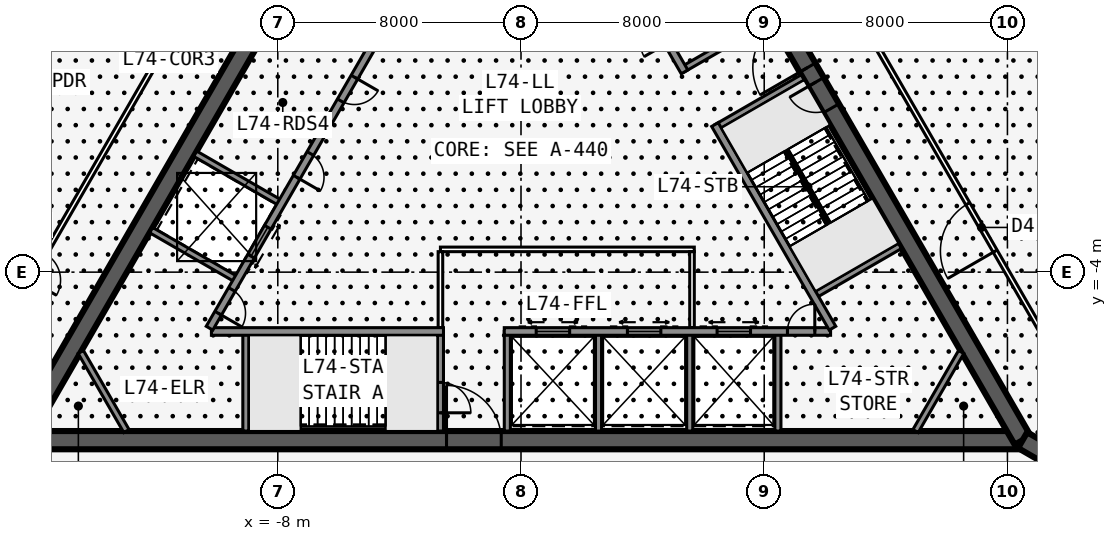
"""IFC4 building model, lengths in metres.
Left out: names, types, materials, properties, quantities, classifications, styles, units other than length and angle.
Written with IfcOpenShell. Run it as: python <this file> out.ifc"""

import sys

from ifc_helpers import new_model, si_unit, direction, frame, frame_2d, origin, place, context, subcontext, project, spatial, rectangle, extrude, element, fill, save


model = new_model("IFC4")
c1 = context("Model", 3, precision=1e-05, world=origin(), true_north=direction((0.0, 1.0)))
c2 = subcontext(c1, "Body", "Model", "MODEL_VIEW")
j1 = project(units=[si_unit("LENGTHUNIT", "METRE"), si_unit("PLANEANGLEUNIT", "RADIAN")], contexts=[c1])
p1 = place(None, origin())
s1 = spatial("IfcSite", under=j1, at=p1, CompositionType="ELEMENT")
p2 = place(p1, origin())
s2 = spatial("IfcBuilding", under=s1, at=p2, CompositionType="ELEMENT")
p3 = place(p2, frame((0.0, 0.0, 281.3)))
s3 = spatial("IfcBuildingStorey", under=s2, at=p3, CompositionType="ELEMENT", Elevation=281.3)
p4 = place(p3, frame((-16.5, -9.526, 0.0), z_axis=(0.0, 0.0, 1.0), x_axis=(1.0, 0.0, 0.0)))
e1 = element("IfcWall", 1, at=p4, inside=s3, PredefinedType="SHEAR", context=c2, shape_type="SweptSolid", body=[
    extrude(rectangle(XDim=33.0, YDim=0.6, at=frame_2d((16.5, 0.0))), origin(), (0.0, 0.0, 1.0), 5.5),
])
p5 = place(p4, frame((14.05, 0.0, 0.0)))
e2 = element("IfcOpeningElement", 2, at=p5, cuts=e1, PredefinedType="OPENING", context=c2, shape_type="SweptSolid", body=[
    extrude(rectangle(XDim=1.8, YDim=2.13, at=frame_2d((0.9, 1.065))), frame((0.0, 0.31, 0.0), z_axis=(0.0, -1.0, 0.0), x_axis=(1.0, 0.0, 0.0)), (0.0, 0.0, 1.0), 0.62),
])
p6 = place(p3, frame((-10.183, -5.951, 0.0), z_axis=(0.0, 0.0, 1.0), x_axis=(1.0, 0.0, 0.0)))
e3 = element("IfcWall", 3, at=p6, inside=s3, PredefinedType="SOLIDWALL", context=c2, shape_type="SweptSolid", body=[
    extrude(rectangle(XDim=7.633, YDim=0.25, at=frame_2d((3.816, 0.0))), origin(), (0.0, 0.0, 1.0), 5.25),
])
p7 = place(p3, frame((-0.55, -5.951, 0.0), z_axis=(0.0, 0.0, 1.0), x_axis=(1.0, 0.0, 0.0)))
e4 = element("IfcWall", 4, at=p7, inside=s3, PredefinedType="SOLIDWALL", context=c2, shape_type="SweptSolid", body=[
    extrude(rectangle(XDim=10.733, YDim=0.25, at=frame_2d((5.366, 0.0))), origin(), (0.0, 0.0, 1.0), 5.25),
])
p8 = place(p7, frame((9.314, 0.0, 0.0)))
e5 = element("IfcOpeningElement", 5, at=p8, cuts=e4, PredefinedType="OPENING", context=c2, shape_type="SweptSolid", body=[
    extrude(rectangle(XDim=0.9, YDim=2.13, at=frame_2d((0.45, 1.065))), frame((0.0, 0.135, 0.0), z_axis=(0.0, -1.0, 0.0), x_axis=(1.0, 0.0, 0.0)), (0.0, 0.0, 1.0), 0.27),
])
p9 = place(p7, frame((1.05, 0.0, 0.0)))
e6 = element("IfcOpeningElement", 6, at=p9, cuts=e4, PredefinedType="OPENING", context=c2, shape_type="SweptSolid", body=[
    extrude(rectangle(XDim=1.1, YDim=2.13, at=frame_2d((0.55, 1.065))), frame((0.0, 0.135, 0.0), z_axis=(0.0, -1.0, 0.0), x_axis=(1.0, 0.0, 0.0)), (0.0, 0.0, 1.0), 0.27),
])
p10 = place(p7, frame((4.05, 0.0, 0.0)))
e7 = element("IfcOpeningElement", 7, at=p10, cuts=e4, PredefinedType="OPENING", context=c2, shape_type="SweptSolid", body=[
    extrude(rectangle(XDim=1.1, YDim=2.13, at=frame_2d((0.55, 1.065))), frame((0.0, 0.135, 0.0), z_axis=(0.0, -1.0, 0.0), x_axis=(1.0, 0.0, 0.0)), (0.0, 0.0, 1.0), 0.27),
])
p11 = place(p7, frame((7.0, 0.0, 0.0)))
e8 = element("IfcOpeningElement", 8, at=p11, cuts=e4, PredefinedType="OPENING", context=c2, shape_type="SweptSolid", body=[
    extrude(rectangle(XDim=1.1, YDim=2.13, at=frame_2d((0.55, 1.065))), frame((0.0, 0.135, 0.0), z_axis=(0.0, -1.0, 0.0), x_axis=(1.0, 0.0, 0.0)), (0.0, 0.0, 1.0), 0.27),
])
p12 = place(p3, frame((-9.05, -5.951, 0.0), z_axis=(0.0, 0.0, 1.0), x_axis=(0.0, -1.0, 0.0)))
e9 = element("IfcWall", 9, at=p12, inside=s3, PredefinedType="SOLIDWALL", context=c2, shape_type="SweptSolid", body=[
    extrude(rectangle(XDim=3.275, YDim=0.2, at=frame_2d((1.637, 0.0))), origin(), (0.0, 0.0, 1.0), 5.25),
])
p13 = place(p3, frame((-2.65, -5.951, 0.0), z_axis=(0.0, 0.0, 1.0), x_axis=(0.0, -1.0, 0.0)))
e10 = element("IfcWall", 10, at=p13, inside=s3, PredefinedType="SOLIDWALL", context=c2, shape_type="SweptSolid", body=[
    extrude(rectangle(XDim=3.275, YDim=0.2, at=frame_2d((1.637, 0.0))), origin(), (0.0, 0.0, 1.0), 5.25),
])
p14 = place(p13, frame((1.675, 0.0, 0.0)))
e11 = element("IfcOpeningElement", 11, at=p14, cuts=e10, PredefinedType="OPENING", context=c2, shape_type="SweptSolid", body=[
    extrude(rectangle(XDim=1.0, YDim=2.13, at=frame_2d((0.5, 1.065))), frame((0.0, 0.11, 0.0), z_axis=(0.0, -1.0, 0.0), x_axis=(1.0, 0.0, 0.0)), (0.0, 0.0, 1.0), 0.22),
])
for number, where, z_axis, x_axis in (
    (12, (-0.45, -5.951, 0.0), (0.0, 0.0, 1.0), (0.0, -1.0, 0.0)),
    (13, (2.55, -5.951, 0.0), (0.0, 0.0, 1.0), (0.0, -1.0, 0.0)),
    (14, (5.55, -5.951, 0.0), (0.0, 0.0, 1.0), (0.0, -1.0, 0.0)),
    (15, (8.45, -5.951, 0.0), (0.0, 0.0, 1.0), (0.0, -1.0, 0.0)),
):
    element("IfcWall", number, at=place(p3, frame(where, z_axis=z_axis, x_axis=x_axis)), inside=s3, PredefinedType="SOLIDWALL", context=c2, shape_type="SweptSolid", body=[
        extrude(rectangle(XDim=3.275, YDim=0.2, at=frame_2d((1.637, 0.0))), origin(), (0.0, 0.0, 1.0), 5.25),
    ])
p15 = place(p3, frame((16.5, -9.526, 0.0), z_axis=(0.0, 0.0, 1.0), x_axis=(-0.499999749417, 0.866025548458, 0.0)))
e16 = element("IfcWall", 16, at=p15, inside=s3, PredefinedType="SHEAR", context=c2, shape_type="SweptSolid", body=[
    extrude(rectangle(XDim=33.0, YDim=0.6, at=frame_2d((16.5, 0.0))), origin(), (0.0, 0.0, 1.0), 5.5),
])
p16 = place(p15, frame((14.15, 0.0, 0.0)))
e17 = element("IfcOpeningElement", 17, at=p16, cuts=e16, PredefinedType="OPENING", context=c2, shape_type="SweptSolid", body=[
    extrude(rectangle(XDim=1.8, YDim=2.13, at=frame_2d((0.9, 1.065))), frame((0.0, 0.31, 0.0), z_axis=(0.0, -1.0, 0.0), x_axis=(1.0, 0.0, 0.0)), (0.0, 0.0, 1.0), 0.62),
])
p17 = place(p15, frame((12.6, 0.0, 0.0)))
e18 = element("IfcOpeningElement", 18, at=p17, cuts=e16, PredefinedType="OPENING", context=c2, shape_type="SweptSolid", body=[
    extrude(rectangle(XDim=1.0, YDim=2.13, at=frame_2d((0.5, 1.065))), frame((0.0, 0.31, 0.0), z_axis=(0.0, -1.0, 0.0), x_axis=(1.0, 0.0, 0.0)), (0.0, 0.0, 1.0), 0.62),
])
p18 = place(p3, frame((10.245, -5.843, 0.0), z_axis=(0.0, 0.0, 1.0), x_axis=(-0.499993009313, 0.866029439822, 0.0)))
e19 = element("IfcWall", 19, at=p18, inside=s3, PredefinedType="SOLIDWALL", context=c2, shape_type="SweptSolid", body=[
    extrude(rectangle(XDim=7.733, YDim=0.25, at=frame_2d((3.866, 0.0))), origin(), (0.0, 0.0, 1.0), 5.25),
])
p19 = place(p3, frame((5.379, 2.586, 0.0), z_axis=(0.0, 0.0, 1.0), x_axis=(-0.500001375892, 0.866024609411, 0.0)))
e20 = element("IfcWall", 20, at=p19, inside=s3, PredefinedType="SOLIDWALL", context=c2, shape_type="SweptSolid", body=[
    extrude(rectangle(XDim=10.633, YDim=0.25, at=frame_2d((5.316, 0.0))), origin(), (0.0, 0.0, 1.0), 5.25),
])
p20 = place(p19, frame((9.164, 0.0, 0.0)))
e21 = element("IfcOpeningElement", 21, at=p20, cuts=e20, PredefinedType="OPENING", context=c2, shape_type="SweptSolid", body=[
    extrude(rectangle(XDim=0.9, YDim=2.13, at=frame_2d((0.45, 1.065))), frame((0.0, 0.135, 0.0), z_axis=(0.0, -1.0, 0.0), x_axis=(1.0, 0.0, 0.0)), (0.0, 0.0, 1.0), 0.27),
])
p21 = place(p19, frame((1.1, 0.0, 0.0)))
e22 = element("IfcOpeningElement", 22, at=p21, cuts=e20, PredefinedType="OPENING", context=c2, shape_type="SweptSolid", body=[
    extrude(rectangle(XDim=0.9, YDim=2.13, at=frame_2d((0.45, 1.065))), frame((0.0, 0.135, 0.0), z_axis=(0.0, -1.0, 0.0), x_axis=(1.0, 0.0, 0.0)), (0.0, 0.0, 1.0), 0.27),
])
p22 = place(p19, frame((4.0, 0.0, 0.0)))
e23 = element("IfcOpeningElement", 23, at=p22, cuts=e20, PredefinedType="OPENING", context=c2, shape_type="SweptSolid", body=[
    extrude(rectangle(XDim=0.9, YDim=2.13, at=frame_2d((0.45, 1.065))), frame((0.0, 0.135, 0.0), z_axis=(0.0, -1.0, 0.0), x_axis=(1.0, 0.0, 0.0)), (0.0, 0.0, 1.0), 0.27),
])
p23 = place(p19, frame((6.9, 0.0, 0.0)))
e24 = element("IfcOpeningElement", 24, at=p23, cuts=e20, PredefinedType="OPENING", context=c2, shape_type="SweptSolid", body=[
    extrude(rectangle(XDim=0.9, YDim=2.13, at=frame_2d((0.45, 1.065))), frame((0.0, 0.135, 0.0), z_axis=(0.0, -1.0, 0.0), x_axis=(1.0, 0.0, 0.0)), (0.0, 0.0, 1.0), 0.27),
])
p24 = place(p3, frame((9.629, -4.775, 0.0), z_axis=(0.0, 0.0, 1.0), x_axis=(0.865995643347, 0.500051543047, 0.0)))
e25 = element("IfcWall", 25, at=p24, inside=s3, PredefinedType="SOLIDWALL", context=c2, shape_type="SweptSolid", body=[
    extrude(rectangle(XDim=3.275, YDim=0.2, at=frame_2d((1.638, 0.0))), origin(), (0.0, 0.0, 1.0), 5.25),
])
for number, where, z_axis, x_axis in (
    (26, (6.429, 0.767, 0.0), (0.0, 0.0, 1.0), (0.866, 0.5, 0.0)),
    (27, (5.329, 2.673, 0.0), (0.0, 0.0, 1.0), (0.866, 0.5, 0.0)),
):
    element("IfcWall", number, at=place(p3, frame(where, z_axis=z_axis, x_axis=x_axis)), inside=s3, PredefinedType="SOLIDWALL", context=c2, shape_type="SweptSolid", body=[
        extrude(rectangle(XDim=3.275, YDim=0.2, at=frame_2d((1.637, 0.0))), origin(), (0.0, 0.0, 1.0), 5.25),
    ])
p25 = place(p3, frame((0.0, 19.052, 0.0), z_axis=(0.0, 0.0, 1.0), x_axis=(-0.499999749417, -0.866025548458, 0.0)))
e28 = element("IfcWall", 28, at=p25, inside=s3, PredefinedType="SHEAR", context=c2, shape_type="SweptSolid", body=[
    extrude(rectangle(XDim=33.0, YDim=0.6, at=frame_2d((16.5, 0.0))), origin(), (0.0, 0.0, 1.0), 5.5),
])
p26 = place(p25, frame((14.15, 0.0, 0.0)))
e29 = element("IfcOpeningElement", 29, at=p26, cuts=e28, PredefinedType="OPENING", context=c2, shape_type="SweptSolid", body=[
    extrude(rectangle(XDim=1.8, YDim=2.13, at=frame_2d((0.9, 1.065))), frame((0.0, 0.31, 0.0), z_axis=(0.0, -1.0, 0.0), x_axis=(1.0, 0.0, 0.0)), (0.0, 0.0, 1.0), 0.62),
])
p27 = place(p25, frame((12.6, 0.0, 0.0)))
e30 = element("IfcOpeningElement", 30, at=p27, cuts=e28, PredefinedType="OPENING", context=c2, shape_type="SweptSolid", body=[
    extrude(rectangle(XDim=1.0, YDim=2.13, at=frame_2d((0.5, 1.065))), frame((0.0, 0.31, 0.0), z_axis=(0.0, -1.0, 0.0), x_axis=(1.0, 0.0, 0.0)), (0.0, 0.0, 1.0), 0.62),
])
p28 = place(p3, frame((-4.929, 3.365, 0.0), z_axis=(0.0, 0.0, 1.0), x_axis=(-0.499991433582, -0.866030349552, 0.0)))
e31 = element("IfcWall", 31, at=p28, inside=s3, PredefinedType="SOLIDWALL", context=c2, shape_type="SweptSolid", body=[
    extrude(rectangle(XDim=10.633, YDim=0.25, at=frame_2d((5.316, 0.0))), origin(), (0.0, 0.0, 1.0), 5.25),
])
p29 = place(p28, frame((9.164, 0.0, 0.0)))
e32 = element("IfcOpeningElement", 32, at=p29, cuts=e31, PredefinedType="OPENING", context=c2, shape_type="SweptSolid", body=[
    extrude(rectangle(XDim=0.9, YDim=2.13, at=frame_2d((0.45, 1.065))), frame((0.0, 0.135, 0.0), z_axis=(0.0, -1.0, 0.0), x_axis=(1.0, 0.0, 0.0)), (0.0, 0.0, 1.0), 0.27),
])
p30 = place(p28, frame((1.1, 0.0, 0.0)))
e33 = element("IfcOpeningElement", 33, at=p30, cuts=e31, PredefinedType="OPENING", context=c2, shape_type="SweptSolid", body=[
    extrude(rectangle(XDim=0.9, YDim=2.13, at=frame_2d((0.45, 1.065))), frame((0.0, 0.135, 0.0), z_axis=(0.0, -1.0, 0.0), x_axis=(1.0, 0.0, 0.0)), (0.0, 0.0, 1.0), 0.27),
])
p31 = place(p28, frame((4.0, 0.0, 0.0)))
e34 = element("IfcOpeningElement", 34, at=p31, cuts=e31, PredefinedType="OPENING", context=c2, shape_type="SweptSolid", body=[
    extrude(rectangle(XDim=0.9, YDim=2.13, at=frame_2d((0.45, 1.065))), frame((0.0, 0.135, 0.0), z_axis=(0.0, -1.0, 0.0), x_axis=(1.0, 0.0, 0.0)), (0.0, 0.0, 1.0), 0.27),
])
p32 = place(p28, frame((6.8, 0.0, 0.0)))
e35 = element("IfcOpeningElement", 35, at=p32, cuts=e31, PredefinedType="OPENING", context=c2, shape_type="SweptSolid", body=[
    extrude(rectangle(XDim=1.1, YDim=2.13, at=frame_2d((0.55, 1.065))), frame((0.0, 0.135, 0.0), z_axis=(0.0, -1.0, 0.0), x_axis=(1.0, 0.0, 0.0)), (0.0, 0.0, 1.0), 0.27),
])
for number, where, z_axis, x_axis in (
    (36, (-4.979, 3.279, 0.0), (0.0, 0.0, 1.0), (-0.866, 0.5, 0.0)),
    (37, (-7.879, -1.744, 0.0), (0.0, 0.0, 1.0), (-0.866, 0.5, 0.0)),
    (38, (-9.329, -4.256, 0.0), (0.0, 0.0, 1.0), (-0.866, 0.5, 0.0)),
):
    element("IfcWall", number, at=place(p3, frame(where, z_axis=z_axis, x_axis=x_axis)), inside=s3, PredefinedType="SOLIDWALL", context=c2, shape_type="SweptSolid", body=[
        extrude(rectangle(XDim=3.275, YDim=0.2, at=frame_2d((1.637, 0.0))), origin(), (0.0, 0.0, 1.0), 5.25),
    ])
p33 = place(p3, frame((16.5, -9.526, 0.0), z_axis=(0.0, 0.0, 1.0), x_axis=(0.866031398331, -0.499989616998, 0.0)))
e39 = element("IfcWall", 39, at=p33, inside=s3, PredefinedType="SHEAR", context=c2, shape_type="SweptSolid", body=[
    extrude(rectangle(XDim=4.746, YDim=0.6, at=frame_2d((2.373, 0.0))), origin(), (0.0, 0.0, 1.0), 5.5),
])
p34 = place(p33, frame((1.65, 0.0, 0.0)))
e40 = element("IfcOpeningElement", 40, at=p34, cuts=e39, PredefinedType="OPENING", context=c2, shape_type="SweptSolid", body=[
    extrude(rectangle(XDim=1.8, YDim=2.13, at=frame_2d((0.9, 1.065))), frame((0.0, 0.31, 0.0), z_axis=(0.0, -1.0, 0.0), x_axis=(1.0, 0.0, 0.0)), (0.0, 0.0, 1.0), 0.62),
])
p35 = place(p3, frame((20.177, -11.245, 0.0), z_axis=(0.0, 0.0, 1.0), x_axis=(-0.499998875317, 0.866026053119, 0.0)))
e41 = element("IfcWall", 41, at=p35, inside=s3, PredefinedType="PARTITIONING", context=c2, shape_type="SweptSolid", body=[
    extrude(rectangle(XDim=39.654, YDim=0.15, at=frame_2d((19.827, 0.0))), origin(), (0.0, 0.0, 1.0), 5.25),
])
p36 = place(p35, frame((9.164, 0.0, 0.0)))
e42 = element("IfcOpeningElement", 42, at=p36, cuts=e41, PredefinedType="OPENING", context=c2, shape_type="SweptSolid", body=[
    extrude(rectangle(XDim=1.8, YDim=2.13, at=frame_2d((0.9, 1.065))), frame((0.0, 0.085, 0.0), z_axis=(0.0, -1.0, 0.0), x_axis=(1.0, 0.0, 0.0)), (0.0, 0.0, 1.0), 0.17),
])
p37 = place(p35, frame((28.69, 0.0, 0.0)))
e43 = element("IfcOpeningElement", 43, at=p37, cuts=e41, PredefinedType="OPENING", context=c2, shape_type="SweptSolid", body=[
    extrude(rectangle(XDim=1.8, YDim=2.13, at=frame_2d((0.9, 1.065))), frame((0.0, 0.085, 0.0), z_axis=(0.0, -1.0, 0.0), x_axis=(1.0, 0.0, 0.0)), (0.0, 0.0, 1.0), 0.17),
])
p38 = place(p3, frame((-0.35, 23.096, 0.0), z_axis=(0.0, 0.0, 1.0), x_axis=(-0.499998875317, -0.866026053119, 0.0)))
e44 = element("IfcWall", 44, at=p38, inside=s3, PredefinedType="PARTITIONING", context=c2, shape_type="SweptSolid", body=[
    extrude(rectangle(XDim=39.654, YDim=0.15, at=frame_2d((19.827, 0.0))), origin(), (0.0, 0.0, 1.0), 5.25),
])
p39 = place(p38, frame((8.063, 0.0, 0.0)))
e45 = element("IfcOpeningElement", 45, at=p39, cuts=e44, PredefinedType="OPENING", context=c2, shape_type="SweptSolid", body=[
    extrude(rectangle(XDim=1.0, YDim=2.13, at=frame_2d((0.5, 1.065))), frame((0.0, 0.085, 0.0), z_axis=(0.0, -1.0, 0.0), x_axis=(1.0, 0.0, 0.0)), (0.0, 0.0, 1.0), 0.17),
])
p40 = place(p38, frame((17.827, 0.0, 0.0)))
e46 = element("IfcOpeningElement", 46, at=p40, cuts=e44, PredefinedType="OPENING", context=c2, shape_type="SweptSolid", body=[
    extrude(rectangle(XDim=1.0, YDim=2.13, at=frame_2d((0.5, 1.065))), frame((0.0, 0.085, 0.0), z_axis=(0.0, -1.0, 0.0), x_axis=(1.0, 0.0, 0.0)), (0.0, 0.0, 1.0), 0.17),
])
p41 = place(p38, frame((20.827, 0.0, 0.0)))
e47 = element("IfcOpeningElement", 47, at=p41, cuts=e44, PredefinedType="OPENING", context=c2, shape_type="SweptSolid", body=[
    extrude(rectangle(XDim=1.0, YDim=2.13, at=frame_2d((0.5, 1.065))), frame((0.0, 0.085, 0.0), z_axis=(0.0, -1.0, 0.0), x_axis=(1.0, 0.0, 0.0)), (0.0, 0.0, 1.0), 0.17),
])
p42 = place(p38, frame((30.591, 0.0, 0.0)))
e48 = element("IfcOpeningElement", 48, at=p42, cuts=e44, PredefinedType="OPENING", context=c2, shape_type="SweptSolid", body=[
    extrude(rectangle(XDim=1.0, YDim=2.13, at=frame_2d((0.5, 1.065))), frame((0.0, 0.085, 0.0), z_axis=(0.0, -1.0, 0.0), x_axis=(1.0, 0.0, 0.0)), (0.0, 0.0, 1.0), 0.17),
])
p43 = place(p3, frame((-2.65, -3.251, 0.0), z_axis=(0.0, 0.0, 1.0), x_axis=(1.0, 0.0, 0.0)))
e49 = element("IfcWall", 49, at=p43, inside=s3, PredefinedType="PARTITIONING", context=c2, shape_type="SweptSolid", body=[
    extrude(rectangle(XDim=8.35, YDim=0.15, at=frame_2d((4.175, 0.0))), origin(), (0.0, 0.0, 1.0), 5.25),
])
for number, where, z_axis, x_axis in (
    (50, (-2.65, -5.826, 0.0), (0.0, 0.0, 1.0), (0.0, 1.0, 0.0)),
    (51, (5.625, -5.826, 0.0), (0.0, 0.0, 1.0), (0.0, 1.0, 0.0)),
):
    element("IfcWall", number, at=place(p3, frame(where, z_axis=z_axis, x_axis=x_axis)), inside=s3, PredefinedType="PARTITIONING", context=c2, shape_type="SweptSolid", body=[
        extrude(rectangle(XDim=2.5, YDim=0.15, at=frame_2d((1.25, 0.0))), origin(), (0.0, 0.0, 1.0), 5.25),
    ])
for number, where, z_axis, x_axis in (
    (52, (14.479, -6.626, 0.0), (0.0, 0.0, 1.0), (-0.5, -0.866, 0.0)),
    (53, (-12.978, -9.226, 0.0), (0.0, 0.0, 1.0), (-0.5, 0.866, 0.0)),
):
    element("IfcWall", number, at=place(p3, frame(where, z_axis=z_axis, x_axis=x_axis)), inside=s3, PredefinedType="SOLIDWALL", context=c2, shape_type="SweptSolid", body=[
        extrude(rectangle(XDim=3.002, YDim=0.2, at=frame_2d((1.501, 0.0))), origin(), (0.0, 0.0, 1.0), 5.25),
    ])
p44 = place(p3, frame((-7.247, -7.576, 0.0), z_axis=(0.0, 0.0, 1.0), x_axis=(1.0, 0.0, 0.0)))
e54 = element("IfcWall", 54, at=p44, inside=s3, PredefinedType="SOLIDWALL", context=c2, shape_type="SweptSolid", body=[
    extrude(rectangle(XDim=2.794, YDim=0.1, at=frame_2d((1.397, 0.0))), origin(), (0.0, 0.0, 1.0), 5.5),
])
p45 = place(p3, frame((10.135, -2.401, 0.0), z_axis=(0.0, 0.0, 1.0), x_axis=(-0.499992232847, 0.866029888106, 0.0)))
e55 = element("IfcWall", 55, at=p45, inside=s3, PredefinedType="SOLIDWALL", context=c2, shape_type="SweptSolid", body=[
    extrude(rectangle(XDim=2.794, YDim=0.1, at=frame_2d((1.397, 0.0))), origin(), (0.0, 0.0, 1.0), 5.5),
])
p46 = place(p36, origin())
e56 = element("IfcDoor", 56, at=p46, inside=s3, OperationType="DOUBLE_DOOR_SINGLE_SWING", PredefinedType="DOOR", context=c2, shape_type="SweptSolid", body=[
    extrude(rectangle(XDim=1.8, YDim=2.13, at=frame_2d((0.9, 1.065))), frame((0.0, 0.025, 0.0), z_axis=(0.0, -1.0, 0.0), x_axis=(1.0, 0.0, 0.0)), (0.0, 0.0, 1.0), 0.05),
])
fill(e42, e56)
p47 = place(p5, origin())
e57 = element("IfcDoor", 57, at=p47, inside=s3, OperationType="DOUBLE_DOOR_SINGLE_SWING", PredefinedType="DOOR", context=c2, shape_type="SweptSolid", body=[
    extrude(rectangle(XDim=1.8, YDim=2.13, at=frame_2d((0.9, 1.065))), frame((0.0, 0.025, 0.0), z_axis=(0.0, -1.0, 0.0), x_axis=(1.0, 0.0, 0.0)), (0.0, 0.0, 1.0), 0.05),
])
fill(e2, e57)
p48 = place(p14, origin())
e58 = element("IfcDoor", 58, at=p48, inside=s3, OperationType="SINGLE_SWING_RIGHT", PredefinedType="DOOR", context=c2, shape_type="SweptSolid", body=[
    extrude(rectangle(XDim=1.0, YDim=2.13, at=frame_2d((0.5, 1.065))), frame((0.0, 0.025, 0.0), z_axis=(0.0, -1.0, 0.0), x_axis=(1.0, 0.0, 0.0)), (0.0, 0.0, 1.0), 0.05),
])
fill(e11, e58)
p49 = place(p16, origin())
e59 = element("IfcDoor", 59, at=p49, inside=s3, OperationType="DOUBLE_DOOR_SINGLE_SWING", PredefinedType="DOOR", context=c2, shape_type="SweptSolid", body=[
    extrude(rectangle(XDim=1.8, YDim=2.13, at=frame_2d((0.9, 1.065))), frame((0.0, 0.025, 0.0), z_axis=(0.0, -1.0, 0.0), x_axis=(1.0, 0.0, 0.0)), (0.0, 0.0, 1.0), 0.05),
])
fill(e17, e59)
p50 = place(p17, origin())
e60 = element("IfcDoor", 60, at=p50, inside=s3, OperationType="SINGLE_SWING_RIGHT", PredefinedType="DOOR", context=c2, shape_type="SweptSolid", body=[
    extrude(rectangle(XDim=1.0, YDim=2.13, at=frame_2d((0.5, 1.065))), frame((0.0, 0.025, 0.0), z_axis=(0.0, -1.0, 0.0), x_axis=(1.0, 0.0, 0.0)), (0.0, 0.0, 1.0), 0.05),
])
fill(e18, e60)
p51 = place(p8, origin())
e61 = element("IfcDoor", 61, at=p51, inside=s3, OperationType="SINGLE_SWING_RIGHT", PredefinedType="DOOR", context=c2, shape_type="SweptSolid", body=[
    extrude(rectangle(XDim=0.9, YDim=2.13, at=frame_2d((0.45, 1.065))), frame((0.0, 0.025, 0.0), z_axis=(0.0, -1.0, 0.0), x_axis=(1.0, 0.0, 0.0)), (0.0, 0.0, 1.0), 0.05),
])
fill(e5, e61)
p52 = place(p29, origin())
e62 = element("IfcDoor", 62, at=p52, inside=s3, OperationType="SINGLE_SWING_RIGHT", PredefinedType="DOOR", context=c2, shape_type="SweptSolid", body=[
    extrude(rectangle(XDim=0.9, YDim=2.13, at=frame_2d((0.45, 1.065))), frame((0.0, 0.025, 0.0), z_axis=(0.0, -1.0, 0.0), x_axis=(1.0, 0.0, 0.0)), (0.0, 0.0, 1.0), 0.05),
])
fill(e32, e62)
p53 = place(p30, origin())
e63 = element("IfcDoor", 63, at=p53, inside=s3, OperationType="SINGLE_SWING_LEFT", PredefinedType="DOOR", context=c2, shape_type="SweptSolid", body=[
    extrude(rectangle(XDim=0.9, YDim=2.13, at=frame_2d((0.45, 1.065))), frame((0.0, 0.025, 0.0), z_axis=(0.0, -1.0, 0.0), x_axis=(1.0, 0.0, 0.0)), (0.0, 0.0, 1.0), 0.05),
])
fill(e33, e63)
p54 = place(p31, origin())
e64 = element("IfcDoor", 64, at=p54, inside=s3, OperationType="SINGLE_SWING_RIGHT", PredefinedType="DOOR", context=c2, shape_type="SweptSolid", body=[
    extrude(rectangle(XDim=0.9, YDim=2.13, at=frame_2d((0.45, 1.065))), frame((0.0, 0.025, 0.0), z_axis=(0.0, -1.0, 0.0), x_axis=(1.0, 0.0, 0.0)), (0.0, 0.0, 1.0), 0.05),
])
fill(e34, e64)
p55 = place(p9, origin())
e65 = element("IfcDoor", 65, at=p55, inside=s3, OperationType="DOUBLE_DOOR_SLIDING", PredefinedType="USERDEFINED", context=c2, shape_type="SweptSolid", body=[
    extrude(rectangle(XDim=1.1, YDim=2.13, at=frame_2d((0.55, 1.065))), frame((0.0, 0.025, 0.0), z_axis=(0.0, -1.0, 0.0), x_axis=(1.0, 0.0, 0.0)), (0.0, 0.0, 1.0), 0.05),
])
fill(e6, e65)
p56 = place(p10, origin())
e66 = element("IfcDoor", 66, at=p56, inside=s3, OperationType="DOUBLE_DOOR_SLIDING", PredefinedType="USERDEFINED", context=c2, shape_type="SweptSolid", body=[
    extrude(rectangle(XDim=1.1, YDim=2.13, at=frame_2d((0.55, 1.065))), frame((0.0, 0.025, 0.0), z_axis=(0.0, -1.0, 0.0), x_axis=(1.0, 0.0, 0.0)), (0.0, 0.0, 1.0), 0.05),
])
fill(e7, e66)
p57 = place(p11, origin())
e67 = element("IfcDoor", 67, at=p57, inside=s3, OperationType="DOUBLE_DOOR_SLIDING", PredefinedType="USERDEFINED", context=c2, shape_type="SweptSolid", body=[
    extrude(rectangle(XDim=1.1, YDim=2.13, at=frame_2d((0.55, 1.065))), frame((0.0, 0.025, 0.0), z_axis=(0.0, -1.0, 0.0), x_axis=(1.0, 0.0, 0.0)), (0.0, 0.0, 1.0), 0.05),
])
fill(e8, e67)
p58 = place(p32, origin())
e68 = element("IfcDoor", 68, at=p58, inside=s3, OperationType="DOUBLE_DOOR_SLIDING", PredefinedType="USERDEFINED", context=c2, shape_type="SweptSolid", body=[
    extrude(rectangle(XDim=1.1, YDim=2.13, at=frame_2d((0.55, 1.065))), frame((0.0, 0.025, 0.0), z_axis=(0.0, -1.0, 0.0), x_axis=(1.0, 0.0, 0.0)), (0.0, 0.0, 1.0), 0.05),
])
fill(e35, e68)
save(model, sys.argv[1])
